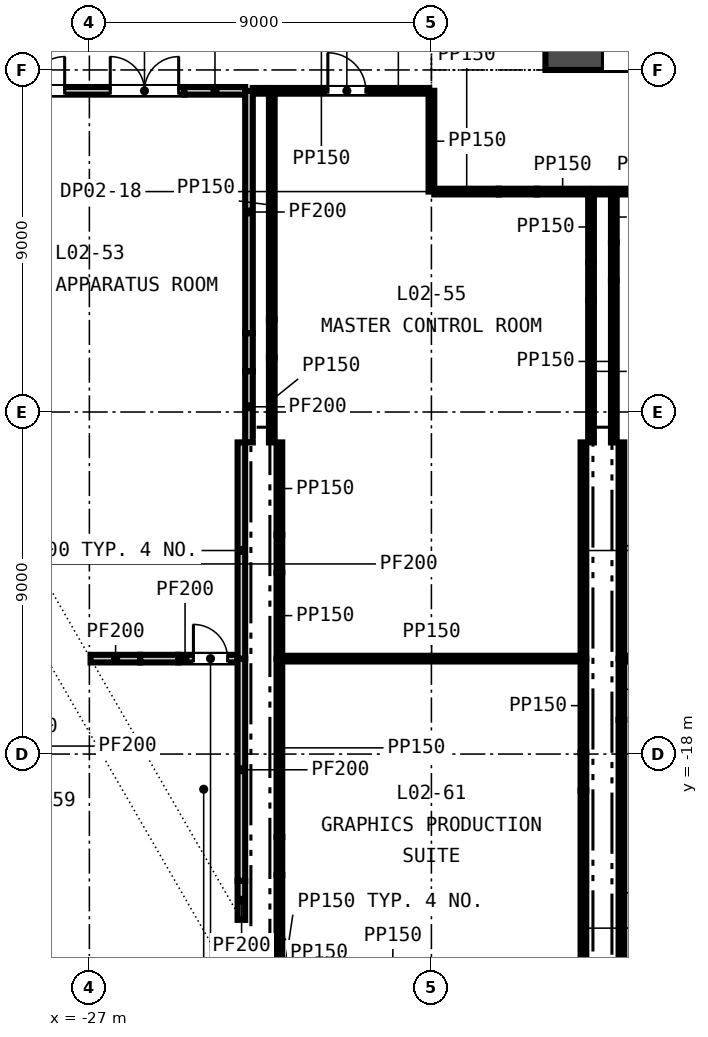
"""IFC4 building model, lengths in metres.
Left out: names, types, materials, properties, quantities, classifications, styles, units other than length and angle.
Written with IfcOpenShell. Run it as: python <this file> out.ifc"""

import sys

from ifc_helpers import new_model, si_unit, direction, frame, frame_2d, origin, place, context, subcontext, project, spatial, rectangle, extrude, element, fill, save


model = new_model("IFC4")
c1 = context("Model", 3, precision=1e-05, world=origin(), true_north=direction((0.0, 1.0)))
c2 = subcontext(c1, "Body", "Model", "MODEL_VIEW")
j1 = project(units=[si_unit("LENGTHUNIT", "METRE"), si_unit("PLANEANGLEUNIT", "RADIAN")], contexts=[c1])
p1 = place(None, origin())
s1 = spatial("IfcSite", under=j1, at=p1, CompositionType="ELEMENT")
p2 = place(p1, origin())
s2 = spatial("IfcBuilding", under=s1, at=p2, CompositionType="ELEMENT")
p3 = place(p2, frame((0.0, 0.0, 18.0)))
s3 = spatial("IfcBuildingStorey", under=s2, at=p3, CompositionType="ELEMENT", Elevation=18.0)
p4 = place(p3, frame((-15.0, 0.5, -0.4), z_axis=(0.0, 0.0, 1.0), x_axis=(1.0, 0.0, 0.0)))
e1 = element("IfcWall", 1, at=p4, inside=s3, PredefinedType="SOLIDWALL", context=c2, shape_type="SweptSolid", body=[
    extrude(rectangle(XDim=30.0, YDim=1.0, at=frame_2d((15.0, 0.0))), origin(), (0.0, 0.0, 1.0), 4.6),
])
p5 = place(p4, frame((5.8, 0.0, 0.4)))
e2 = element("IfcOpeningElement", 2, at=p5, cuts=e1, PredefinedType="OPENING", context=c2, shape_type="SweptSolid", body=[
    extrude(rectangle(XDim=2.4, YDim=2.4, at=frame_2d((1.2, 1.2))), frame((0.0, 0.51, 0.0), z_axis=(0.0, -1.0, 0.0), x_axis=(1.0, 0.0, 0.0)), (0.0, 0.0, 1.0), 1.02),
])
p6 = place(p4, frame((13.8, 0.0, 0.4)))
e3 = element("IfcOpeningElement", 3, at=p6, cuts=e1, PredefinedType="OPENING", context=c2, shape_type="SweptSolid", body=[
    extrude(rectangle(XDim=2.4, YDim=2.4, at=frame_2d((1.2, 1.2))), frame((0.0, 0.51, 0.0), z_axis=(0.0, -1.0, 0.0), x_axis=(1.0, 0.0, 0.0)), (0.0, 0.0, 1.0), 1.02),
])
p7 = place(p4, frame((21.8, 0.0, 0.4)))
e4 = element("IfcOpeningElement", 4, at=p7, cuts=e1, PredefinedType="OPENING", context=c2, shape_type="SweptSolid", body=[
    extrude(rectangle(XDim=2.4, YDim=2.4, at=frame_2d((1.2, 1.2))), frame((0.0, 0.51, 0.0), z_axis=(0.0, -1.0, 0.0), x_axis=(1.0, 0.0, 0.0)), (0.0, 0.0, 1.0), 1.02),
])
p8 = place(p4, frame((1.5, 0.0, 0.4)))
e5 = element("IfcOpeningElement", 5, at=p8, cuts=e1, PredefinedType="OPENING", context=c2, shape_type="SweptSolid", body=[
    extrude(rectangle(XDim=1.2, YDim=2.1, at=frame_2d((0.6, 1.05))), frame((0.0, 0.51, 0.0), z_axis=(0.0, -1.0, 0.0), x_axis=(1.0, 0.0, 0.0)), (0.0, 0.0, 1.0), 1.02),
])
p9 = place(p4, frame((27.3, 0.0, 0.4)))
e6 = element("IfcOpeningElement", 6, at=p9, cuts=e1, PredefinedType="OPENING", context=c2, shape_type="SweptSolid", body=[
    extrude(rectangle(XDim=1.2, YDim=2.1, at=frame_2d((0.6, 1.05))), frame((0.0, 0.51, 0.0), z_axis=(0.0, -1.0, 0.0), x_axis=(1.0, 0.0, 0.0)), (0.0, 0.0, 1.0), 1.02),
])
p10 = place(p3, frame((-26.968, -15.489, 0.0), z_axis=(0.0, 0.0, 1.0), x_axis=(1.0, 0.0, 0.0)))
e7 = element("IfcWall", 7, at=p10, inside=s3, PredefinedType="PARTITIONING", context=c2, shape_type="SweptSolid", body=[
    extrude(rectangle(XDim=1.306, YDim=0.2, at=frame_2d((0.653, 0.0))), origin(), (0.0, 0.0, 1.0), 4.2),
])
p11 = place(p3, frame((-25.662, -15.489, 0.0), z_axis=(0.0, 0.0, 1.0), x_axis=(1.0, 0.0, 0.0)))
e8 = element("IfcWall", 8, at=p11, inside=s3, PredefinedType="PARTITIONING", context=c2, shape_type="SweptSolid", body=[
    extrude(rectangle(XDim=1.0, YDim=0.2, at=frame_2d((0.5, 0.0))), origin(), (0.0, 0.0, 1.0), 3.597),
])
p12 = place(p3, frame((-24.662, -15.489, 0.0), z_axis=(0.0, 0.0, 1.0), x_axis=(1.0, 0.0, 0.0)))
e9 = element("IfcWall", 9, at=p12, inside=s3, PredefinedType="PARTITIONING", context=c2, shape_type="SweptSolid", body=[
    extrude(rectangle(XDim=1.562, YDim=0.2, at=frame_2d((0.781, 0.0))), origin(), (0.0, 0.0, 1.0), 3.111),
])
p13 = place(p12, frame((0.4, 0.0, 0.0)))
e10 = element("IfcOpeningElement", 10, at=p13, cuts=e9, PredefinedType="OPENING", context=c2, shape_type="SweptSolid", body=[
    extrude(rectangle(XDim=0.9, YDim=2.1, at=frame_2d((0.45, 1.05))), frame((0.0, 0.11, 0.0), z_axis=(0.0, -1.0, 0.0), x_axis=(1.0, 0.0, 0.0)), (0.0, 0.0, 1.0), 0.22),
])
p14 = place(p3, frame((-21.925, -15.489, 0.0), z_axis=(0.0, 0.0, 1.0), x_axis=(1.0, 0.0, 0.0)))
e11 = element("IfcWall", 11, at=p14, inside=s3, PredefinedType="PARTITIONING", context=c2, shape_type="SweptSolid", body=[
    extrude(rectangle(XDim=7.85, YDim=0.15, at=frame_2d((3.925, 0.0))), origin(), (0.0, 0.0, 1.0), 4.2),
])
p15 = place(p3, frame((-12.925, -15.489, 0.0), z_axis=(0.0, 0.0, 1.0), x_axis=(1.0, 0.0, 0.0)))
e12 = element("IfcWall", 12, at=p15, inside=s3, PredefinedType="PARTITIONING", context=c2, shape_type="SweptSolid", body=[
    extrude(rectangle(XDim=3.895, YDim=0.15, at=frame_2d((1.948, 0.0))), origin(), (0.0, 0.0, 1.0), 4.2),
])
p16 = place(p3, frame((-17.925, -3.2, 0.0), z_axis=(0.0, 0.0, 1.0), x_axis=(1.0, 0.0, 0.0)))
e13 = element("IfcWall", 13, at=p16, inside=s3, PredefinedType="PARTITIONING", context=c2, shape_type="SweptSolid", body=[
    extrude(rectangle(XDim=1.697, YDim=0.15, at=frame_2d((0.849, 0.0))), origin(), (0.0, 0.0, 1.0), 4.2),
])
p17 = place(p3, frame((-16.228, -3.2, 0.0), z_axis=(0.0, 0.0, 1.0), x_axis=(1.0, 0.0, 0.0)))
e14 = element("IfcWall", 14, at=p17, inside=s3, PredefinedType="PARTITIONING", context=c2, shape_type="SweptSolid", body=[
    extrude(rectangle(XDim=1.0, YDim=0.15, at=frame_2d((0.5, 0.0))), origin(), (0.0, 0.0, 1.0), 3.365),
])
p18 = place(p3, frame((-15.228, -3.2, 0.0), z_axis=(0.0, 0.0, 1.0), x_axis=(1.0, 0.0, 0.0)))
e15 = element("IfcWall", 15, at=p18, inside=s3, PredefinedType="PARTITIONING", context=c2, shape_type="SweptSolid", body=[
    extrude(rectangle(XDim=1.353, YDim=0.15, at=frame_2d((0.676, 0.0))), origin(), (0.0, 0.0, 1.0), 4.2),
])
p19 = place(p3, frame((-13.725, -3.2, 0.0), z_axis=(0.0, 0.0, 1.0), x_axis=(1.0, 0.0, 0.0)))
e16 = element("IfcWall", 16, at=p19, inside=s3, PredefinedType="PARTITIONING", context=c2, shape_type="SweptSolid", body=[
    extrude(rectangle(XDim=0.45, YDim=0.15, at=frame_2d((0.225, 0.0))), origin(), (0.0, 0.0, 1.0), 4.2),
])
p20 = place(p3, frame((-13.125, -3.2, 0.0), z_axis=(0.0, 0.0, 1.0), x_axis=(1.0, 0.0, 0.0)))
e17 = element("IfcWall", 17, at=p20, inside=s3, PredefinedType="PARTITIONING", context=c2, shape_type="SweptSolid", body=[
    extrude(rectangle(XDim=1.529, YDim=0.15, at=frame_2d((0.764, 0.0))), origin(), (0.0, 0.0, 1.0), 4.2),
])
p21 = place(p3, frame((-31.1, -0.549, 0.0), z_axis=(0.0, 0.0, 1.0), x_axis=(1.0, 0.0, 0.0)))
e18 = element("IfcWall", 18, at=p21, inside=s3, PredefinedType="PARTITIONING", context=c2, shape_type="SweptSolid", body=[
    extrude(rectangle(XDim=6.6, YDim=0.2, at=frame_2d((3.3, 0.0))), origin(), (0.0, 0.0, 1.0), 4.2),
])
p22 = place(p21, frame((1.65, 0.0, 0.0)))
e19 = element("IfcOpeningElement", 19, at=p22, cuts=e18, PredefinedType="OPENING", context=c2, shape_type="SweptSolid", body=[
    extrude(rectangle(XDim=1.8, YDim=2.4, at=frame_2d((0.9, 1.2))), frame((0.0, 0.11, 0.0), z_axis=(0.0, -1.0, 0.0), x_axis=(1.0, 0.0, 0.0)), (0.0, 0.0, 1.0), 0.22),
])
p23 = place(p21, frame((4.65, 0.0, 0.0)))
e20 = element("IfcOpeningElement", 20, at=p23, cuts=e18, PredefinedType="OPENING", context=c2, shape_type="SweptSolid", body=[
    extrude(rectangle(XDim=1.8, YDim=2.4, at=frame_2d((0.9, 1.2))), frame((0.0, 0.11, 0.0), z_axis=(0.0, -1.0, 0.0), x_axis=(1.0, 0.0, 0.0)), (0.0, 0.0, 1.0), 0.22),
])
p24 = place(p3, frame((-24.5, -0.549, 0.0), z_axis=(0.0, 0.0, 1.0), x_axis=(1.0, 0.0, 0.0)))
e21 = element("IfcWall", 21, at=p24, inside=s3, PredefinedType="PARTITIONING", context=c2, shape_type="SweptSolid", body=[
    extrude(rectangle(XDim=1.6, YDim=0.2, at=frame_2d((0.8, 0.0))), origin(), (0.0, 0.0, 1.0), 3.111),
])
p25 = place(p3, frame((-22.7, -0.549, 0.0), z_axis=(0.0, 0.0, 1.0), x_axis=(1.0, 0.0, 0.0)))
e22 = element("IfcWall", 22, at=p25, inside=s3, PredefinedType="PARTITIONING", context=c2, shape_type="SweptSolid", body=[
    extrude(rectangle(XDim=0.425, YDim=0.15, at=frame_2d((0.212, 0.0))), origin(), (0.0, 0.0, 1.0), 4.2),
])
p26 = place(p3, frame((-22.125, -0.549, 0.0), z_axis=(0.0, 0.0, 1.0), x_axis=(1.0, 0.0, 0.0)))
e23 = element("IfcWall", 23, at=p26, inside=s3, PredefinedType="PARTITIONING", context=c2, shape_type="SweptSolid", body=[
    extrude(rectangle(XDim=4.05, YDim=0.15, at=frame_2d((2.025, 0.0))), origin(), (0.0, 0.0, 1.0), 4.2),
])
p27 = place(p26, frame((1.4, 0.0, 0.0)))
e24 = element("IfcOpeningElement", 24, at=p27, cuts=e23, PredefinedType="OPENING", context=c2, shape_type="SweptSolid", body=[
    extrude(rectangle(XDim=1.0, YDim=2.1, at=frame_2d((0.5, 1.05))), frame((0.0, 0.085, 0.0), z_axis=(0.0, -1.0, 0.0), x_axis=(1.0, 0.0, 0.0)), (0.0, 0.0, 1.0), 0.17),
])
p28 = place(p3, frame((-23.0, -22.363, 0.0), z_axis=(0.0, 0.0, 1.0), x_axis=(0.0, 1.0, 0.0)))
e25 = element("IfcWall", 25, at=p28, inside=s3, PredefinedType="PARTITIONING", context=c2, shape_type="SweptSolid", body=[
    extrude(rectangle(XDim=1.027, YDim=0.2, at=frame_2d((0.513, 0.0))), origin(), (0.0, 0.0, 1.0), 3.219),
])
p29 = place(p3, frame((-23.0, -21.336, 0.0), z_axis=(0.0, 0.0, 1.0), x_axis=(0.0, 1.0, 0.0)))
e26 = element("IfcWall", 26, at=p29, inside=s3, PredefinedType="PARTITIONING", context=c2, shape_type="SweptSolid", body=[
    extrude(rectangle(XDim=5.846, YDim=0.2, at=frame_2d((2.923, 0.0))), origin(), (0.0, 0.0, 1.0), 4.2),
])
p30 = place(p3, frame((-23.0, -15.489, 0.0), z_axis=(0.0, 0.0, 1.0), x_axis=(0.0, 1.0, 0.0)))
e27 = element("IfcWall", 27, at=p30, inside=s3, PredefinedType="PARTITIONING", context=c2, shape_type="SweptSolid", body=[
    extrude(rectangle(XDim=5.688, YDim=0.2, at=frame_2d((2.844, 0.0))), origin(), (0.0, 0.0, 1.0), 4.2),
])
p31 = place(p3, frame((-22.8, -9.8, 0.0), z_axis=(0.0, 0.0, 1.0), x_axis=(0.0, 1.0, 0.0)))
e28 = element("IfcWall", 28, at=p31, inside=s3, PredefinedType="PARTITIONING", context=c2, shape_type="SweptSolid", body=[
    extrude(rectangle(XDim=1.875, YDim=0.2, at=frame_2d((0.938, 0.0))), origin(), (0.0, 0.0, 1.0), 4.2),
])
p32 = place(p3, frame((-22.8, -7.925, 0.0), z_axis=(0.0, 0.0, 1.0), x_axis=(0.0, 1.0, 0.0)))
e29 = element("IfcWall", 29, at=p32, inside=s3, PredefinedType="PARTITIONING", context=c2, shape_type="SweptSolid", body=[
    extrude(rectangle(XDim=1.0, YDim=0.2, at=frame_2d((0.5, 0.0))), origin(), (0.0, 0.0, 1.0), 3.365),
])
p33 = place(p3, frame((-22.8, -6.925, 0.0), z_axis=(0.0, 0.0, 1.0), x_axis=(0.0, 1.0, 0.0)))
e30 = element("IfcWall", 30, at=p33, inside=s3, PredefinedType="PARTITIONING", context=c2, shape_type="SweptSolid", body=[
    extrude(rectangle(XDim=6.375, YDim=0.2, at=frame_2d((3.188, 0.0))), origin(), (0.0, 0.0, 1.0), 4.2),
])
p34 = place(p3, frame((-22.2, -9.8, 0.0), z_axis=(0.0, 0.0, 1.0), x_axis=(0.0, 1.0, 0.0)))
e31 = element("IfcWall", 31, at=p34, inside=s3, PredefinedType="PARTITIONING", context=c2, shape_type="SweptSolid", body=[
    extrude(rectangle(XDim=2.233, YDim=0.15, at=frame_2d((1.117, 0.0))), origin(), (0.0, 0.0, 1.0), 4.2),
])
p35 = place(p3, frame((-22.2, -7.567, 0.0), z_axis=(0.0, 0.0, 1.0), x_axis=(0.0, 1.0, 0.0)))
e32 = element("IfcWall", 32, at=p35, inside=s3, PredefinedType="PARTITIONING", context=c2, shape_type="SweptSolid", body=[
    extrude(rectangle(XDim=1.0, YDim=0.15, at=frame_2d((0.5, 0.0))), origin(), (0.0, 0.0, 1.0), 3.365),
])
p36 = place(p3, frame((-22.2, -6.567, 0.0), z_axis=(0.0, 0.0, 1.0), x_axis=(0.0, 1.0, 0.0)))
e33 = element("IfcWall", 33, at=p36, inside=s3, PredefinedType="PARTITIONING", context=c2, shape_type="SweptSolid", body=[
    extrude(rectangle(XDim=6.017, YDim=0.15, at=frame_2d((3.009, 0.0))), origin(), (0.0, 0.0, 1.0), 4.2),
])
p37 = place(p3, frame((-22.0, -24.095, 0.0), z_axis=(0.0, 0.0, 1.0), x_axis=(0.0, 1.0, 0.0)))
e34 = element("IfcWall", 34, at=p37, inside=s3, PredefinedType="PARTITIONING", context=c2, shape_type="SweptSolid", body=[
    extrude(rectangle(XDim=2.912, YDim=0.15, at=frame_2d((1.456, 0.0))), origin(), (0.0, 0.0, 1.0), 4.2),
])
p38 = place(p3, frame((-22.0, -21.183, 0.0), z_axis=(0.0, 0.0, 1.0), x_axis=(0.0, 1.0, 0.0)))
e35 = element("IfcWall", 35, at=p38, inside=s3, PredefinedType="PARTITIONING", context=c2, shape_type="SweptSolid", body=[
    extrude(rectangle(XDim=1.0, YDim=0.15, at=frame_2d((0.5, 0.0))), origin(), (0.0, 0.0, 1.0), 3.597),
])
p39 = place(p3, frame((-22.0, -20.183, 0.0), z_axis=(0.0, 0.0, 1.0), x_axis=(0.0, 1.0, 0.0)))
e36 = element("IfcWall", 36, at=p39, inside=s3, PredefinedType="PARTITIONING", context=c2, shape_type="SweptSolid", body=[
    extrude(rectangle(XDim=4.692, YDim=0.15, at=frame_2d((2.346, 0.0))), origin(), (0.0, 0.0, 1.0), 4.2),
])
p40 = place(p3, frame((-22.0, -15.489, 0.0), z_axis=(0.0, 0.0, 1.0), x_axis=(0.0, 1.0, 0.0)))
e37 = element("IfcWall", 37, at=p40, inside=s3, PredefinedType="PARTITIONING", context=c2, shape_type="SweptSolid", body=[
    extrude(rectangle(XDim=2.262, YDim=0.15, at=frame_2d((1.131, 0.0))), origin(), (0.0, 0.0, 1.0), 4.2),
])
p41 = place(p3, frame((-22.0, -13.226, 0.0), z_axis=(0.0, 0.0, 1.0), x_axis=(0.0, 1.0, 0.0)))
e38 = element("IfcWall", 38, at=p41, inside=s3, PredefinedType="PARTITIONING", context=c2, shape_type="SweptSolid", body=[
    extrude(rectangle(XDim=1.0, YDim=0.15, at=frame_2d((0.5, 0.0))), origin(), (0.0, 0.0, 1.0), 3.298),
])
p42 = place(p3, frame((-22.0, -12.226, 0.0), z_axis=(0.0, 0.0, 1.0), x_axis=(0.0, 1.0, 0.0)))
e39 = element("IfcWall", 39, at=p42, inside=s3, PredefinedType="PARTITIONING", context=c2, shape_type="SweptSolid", body=[
    extrude(rectangle(XDim=2.426, YDim=0.15, at=frame_2d((1.213, 0.0))), origin(), (0.0, 0.0, 1.0), 4.2),
])
p43 = place(p3, frame((-18.0, -3.2, 0.0), z_axis=(0.0, 0.0, 1.0), x_axis=(0.0, 1.0, 0.0)))
e40 = element("IfcWall", 40, at=p43, inside=s3, PredefinedType="PARTITIONING", context=c2, shape_type="SweptSolid", body=[
    extrude(rectangle(XDim=2.651, YDim=0.15, at=frame_2d((1.326, 0.0))), origin(), (0.0, 0.0, 1.0), 4.2),
])
p44 = place(p3, frame((-14.0, -26.2, 0.0), z_axis=(0.0, 0.0, 1.0), x_axis=(0.0, 1.0, 0.0)))
e41 = element("IfcWall", 41, at=p44, inside=s3, PredefinedType="PARTITIONING", context=c2, shape_type="SweptSolid", body=[
    extrude(rectangle(XDim=7.239, YDim=0.15, at=frame_2d((3.62, 0.0))), origin(), (0.0, 0.0, 1.0), 4.2),
])
p45 = place(p3, frame((-14.0, -18.961, 0.0), z_axis=(0.0, 0.0, 1.0), x_axis=(0.0, 1.0, 0.0)))
e42 = element("IfcWall", 42, at=p45, inside=s3, PredefinedType="PARTITIONING", context=c2, shape_type="SweptSolid", body=[
    extrude(rectangle(XDim=1.0, YDim=0.15, at=frame_2d((0.5, 0.0))), origin(), (0.0, 0.0, 1.0), 3.521),
])
p46 = place(p3, frame((-14.0, -17.961, 0.0), z_axis=(0.0, 0.0, 1.0), x_axis=(0.0, 1.0, 0.0)))
e43 = element("IfcWall", 43, at=p46, inside=s3, PredefinedType="PARTITIONING", context=c2, shape_type="SweptSolid", body=[
    extrude(rectangle(XDim=2.47, YDim=0.15, at=frame_2d((1.235, 0.0))), origin(), (0.0, 0.0, 1.0), 4.2),
])
p47 = place(p3, frame((-14.0, -15.489, 0.0), z_axis=(0.0, 0.0, 1.0), x_axis=(0.0, 1.0, 0.0)))
e44 = element("IfcWall", 44, at=p47, inside=s3, PredefinedType="PARTITIONING", context=c2, shape_type="SweptSolid", body=[
    extrude(rectangle(XDim=5.688, YDim=0.15, at=frame_2d((2.844, 0.0))), origin(), (0.0, 0.0, 1.0), 4.2),
])
p48 = place(p3, frame((-13.8, -9.8, 0.0), z_axis=(0.0, 0.0, 1.0), x_axis=(0.0, 1.0, 0.0)))
e45 = element("IfcWall", 45, at=p48, inside=s3, PredefinedType="PARTITIONING", context=c2, shape_type="SweptSolid", body=[
    extrude(rectangle(XDim=3.738, YDim=0.15, at=frame_2d((1.869, 0.0))), origin(), (0.0, 0.0, 1.0), 4.2),
])
p49 = place(p3, frame((-13.8, -6.062, 0.0), z_axis=(0.0, 0.0, 1.0), x_axis=(0.0, 1.0, 0.0)))
e46 = element("IfcWall", 46, at=p49, inside=s3, PredefinedType="PARTITIONING", context=c2, shape_type="SweptSolid", body=[
    extrude(rectangle(XDim=1.0, YDim=0.15, at=frame_2d((0.5, 0.0))), origin(), (0.0, 0.0, 1.0), 3.298),
])
p50 = place(p3, frame((-13.8, -5.062, 0.0), z_axis=(0.0, 0.0, 1.0), x_axis=(0.0, 1.0, 0.0)))
e47 = element("IfcWall", 47, at=p50, inside=s3, PredefinedType="PARTITIONING", context=c2, shape_type="SweptSolid", body=[
    extrude(rectangle(XDim=1.861, YDim=0.15, at=frame_2d((0.931, 0.0))), origin(), (0.0, 0.0, 1.0), 4.2),
])
p51 = place(p3, frame((-13.2, -9.8, 0.0), z_axis=(0.0, 0.0, 1.0), x_axis=(0.0, 1.0, 0.0)))
e48 = element("IfcWall", 48, at=p51, inside=s3, PredefinedType="PARTITIONING", context=c2, shape_type="SweptSolid", body=[
    extrude(rectangle(XDim=4.262, YDim=0.15, at=frame_2d((2.131, 0.0))), origin(), (0.0, 0.0, 1.0), 4.2),
])
p52 = place(p3, frame((-13.2, -5.538, 0.0), z_axis=(0.0, 0.0, 1.0), x_axis=(0.0, 1.0, 0.0)))
e49 = element("IfcWall", 49, at=p52, inside=s3, PredefinedType="PARTITIONING", context=c2, shape_type="SweptSolid", body=[
    extrude(rectangle(XDim=1.0, YDim=0.15, at=frame_2d((0.5, 0.0))), origin(), (0.0, 0.0, 1.0), 3.298),
])
p53 = place(p3, frame((-13.2, -4.538, 0.0), z_axis=(0.0, 0.0, 1.0), x_axis=(0.0, 1.0, 0.0)))
e50 = element("IfcWall", 50, at=p53, inside=s3, PredefinedType="PARTITIONING", context=c2, shape_type="SweptSolid", body=[
    extrude(rectangle(XDim=1.337, YDim=0.15, at=frame_2d((0.668, 0.0))), origin(), (0.0, 0.0, 1.0), 4.2),
])
p54 = place(p3, frame((-13.0, -26.2, 0.0), z_axis=(0.0, 0.0, 1.0), x_axis=(0.0, 1.0, 0.0)))
e51 = element("IfcWall", 51, at=p54, inside=s3, PredefinedType="PARTITIONING", context=c2, shape_type="SweptSolid", body=[
    extrude(rectangle(XDim=9.098, YDim=0.15, at=frame_2d((4.549, 0.0))), origin(), (0.0, 0.0, 1.0), 4.2),
])
p55 = place(p3, frame((-13.0, -17.102, 0.0), z_axis=(0.0, 0.0, 1.0), x_axis=(0.0, 1.0, 0.0)))
e52 = element("IfcWall", 52, at=p55, inside=s3, PredefinedType="PARTITIONING", context=c2, shape_type="SweptSolid", body=[
    extrude(rectangle(XDim=1.612, YDim=0.15, at=frame_2d((0.806, 0.0))), origin(), (0.0, 0.0, 1.0), 3.749),
])
p56 = place(p3, frame((-13.0, -15.489, 0.0), z_axis=(0.0, 0.0, 1.0), x_axis=(0.0, 1.0, 0.0)))
e53 = element("IfcWall", 53, at=p56, inside=s3, PredefinedType="PARTITIONING", context=c2, shape_type="SweptSolid", body=[
    extrude(rectangle(XDim=5.688, YDim=0.15, at=frame_2d((2.844, 0.0))), origin(), (0.0, 0.0, 1.0), 4.2),
])
p57 = place(p22, origin())
e54 = element("IfcDoor", 54, at=p57, inside=s3, OperationType="SINGLE_SWING_LEFT", PredefinedType="DOOR", context=c2, shape_type="SweptSolid", body=[
    extrude(rectangle(XDim=1.8, YDim=2.4, at=frame_2d((0.9, 1.2))), frame((0.0, 0.025, 0.0), z_axis=(0.0, -1.0, 0.0), x_axis=(1.0, 0.0, 0.0)), (0.0, 0.0, 1.0), 0.05),
])
fill(e19, e54)
p58 = place(p23, origin())
e55 = element("IfcDoor", 55, at=p58, inside=s3, OperationType="SINGLE_SWING_LEFT", PredefinedType="DOOR", context=c2, shape_type="SweptSolid", body=[
    extrude(rectangle(XDim=1.8, YDim=2.4, at=frame_2d((0.9, 1.2))), frame((0.0, 0.025, 0.0), z_axis=(0.0, -1.0, 0.0), x_axis=(1.0, 0.0, 0.0)), (0.0, 0.0, 1.0), 0.05),
])
fill(e20, e55)
p59 = place(p27, origin())
e56 = element("IfcDoor", 56, at=p59, inside=s3, OperationType="SINGLE_SWING_LEFT", PredefinedType="DOOR", context=c2, shape_type="SweptSolid", body=[
    extrude(rectangle(XDim=1.0, YDim=2.1, at=frame_2d((0.5, 1.05))), frame((0.0, 0.025, 0.0), z_axis=(0.0, -1.0, 0.0), x_axis=(1.0, 0.0, 0.0)), (0.0, 0.0, 1.0), 0.05),
])
fill(e24, e56)
p60 = place(p13, origin())
e57 = element("IfcDoor", 57, at=p60, inside=s3, OperationType="SINGLE_SWING_LEFT", PredefinedType="DOOR", context=c2, shape_type="SweptSolid", body=[
    extrude(rectangle(XDim=0.9, YDim=2.1, at=frame_2d((0.45, 1.05))), frame((0.0, 0.025, 0.0), z_axis=(0.0, -1.0, 0.0), x_axis=(1.0, 0.0, 0.0)), (0.0, 0.0, 1.0), 0.05),
])
fill(e10, e57)
save(model, sys.argv[1])
